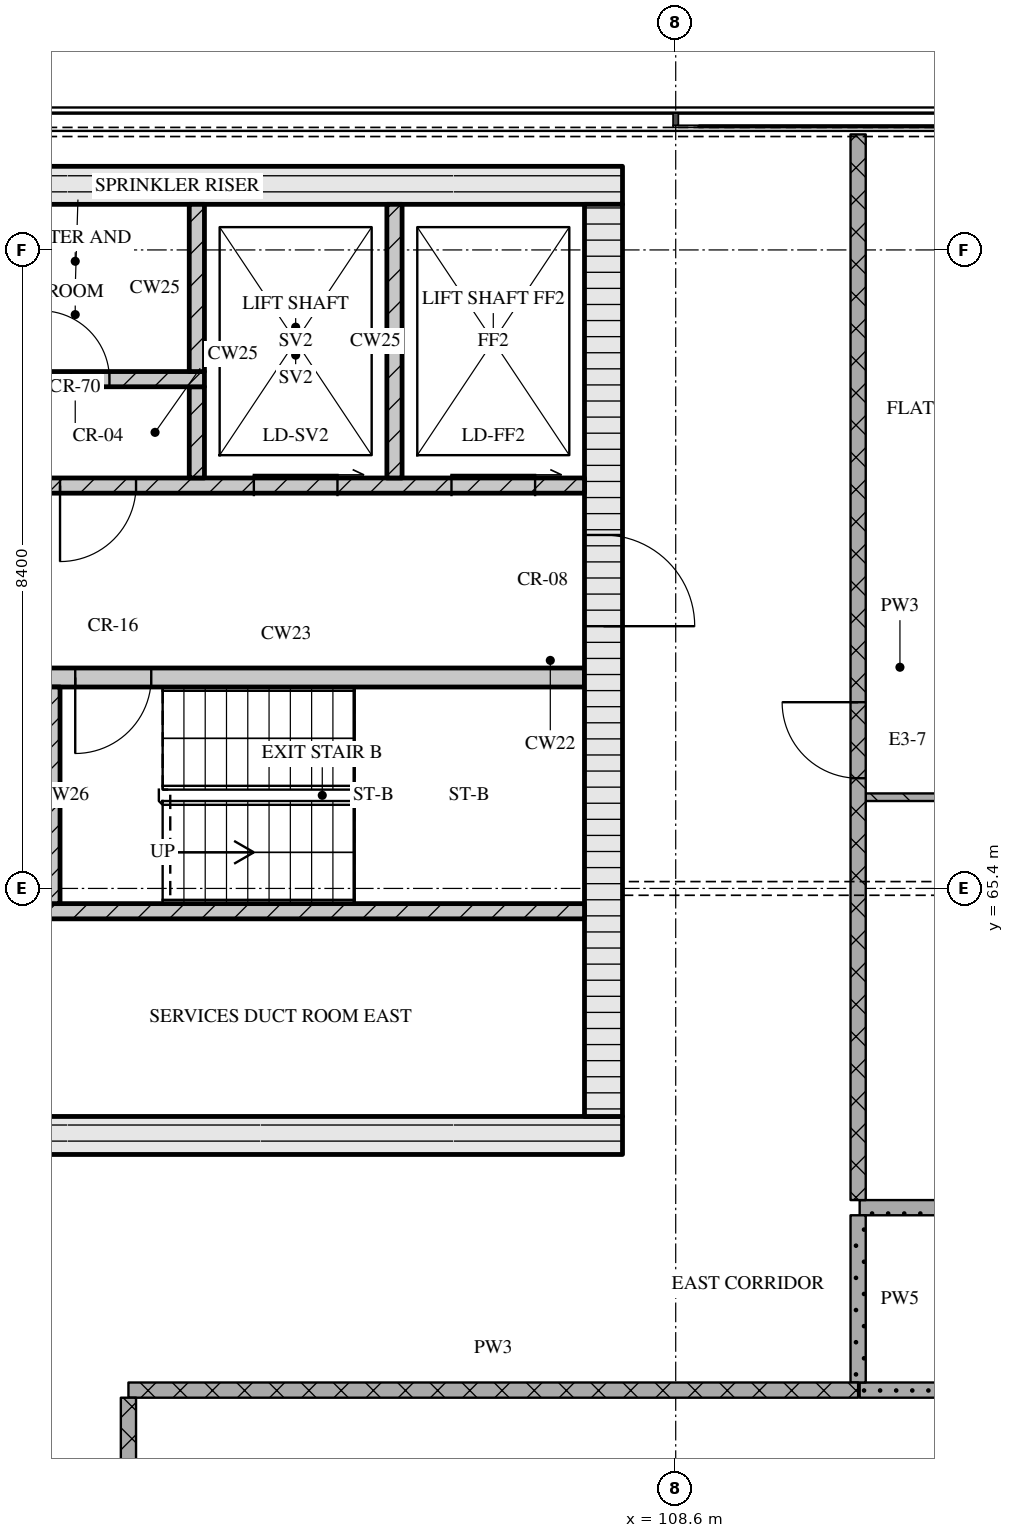
"""IFC4 building model, lengths in metres.
Left out: names, types, materials, properties, quantities, classifications, styles, units other than length and angle.
Written with IfcOpenShell. Run it as: python <this file> out.ifc"""

import sys

from ifc_helpers import new_model, si_unit, direction, frame, frame_2d, origin, place, context, subcontext, project, spatial, rectangle, extrude, element, fill, save


model = new_model("IFC4")
c1 = context("Model", 3, precision=1e-05, world=origin(), true_north=direction((0.0, 1.0)))
c2 = subcontext(c1, "Body", "Model", "MODEL_VIEW")
j1 = project(units=[si_unit("LENGTHUNIT", "METRE"), si_unit("PLANEANGLEUNIT", "RADIAN")], contexts=[c1])
p1 = place(None, origin())
s1 = spatial("IfcSite", under=j1, at=p1, CompositionType="ELEMENT")
p2 = place(p1, origin())
s2 = spatial("IfcBuilding", under=s1, at=p2, CompositionType="ELEMENT")
p3 = place(p2, frame((0.0, 0.0, 277.95)))
s3 = spatial("IfcBuildingStorey", under=s2, at=p3, CompositionType="ELEMENT", Elevation=277.95)
p4 = place(p3, frame((67.3, 62.15, 0.0), z_axis=(0.0, 0.0, 1.0), x_axis=(1.0, 0.0, 0.0)))
e1 = element("IfcWall", 1, at=p4, inside=s3, PredefinedType="SOLIDWALL", context=c2, shape_type="SweptSolid", body=[
    extrude(rectangle(XDim=40.6, YDim=0.5, at=frame_2d((20.3, 0.0))), origin(), (0.0, 0.0, 1.0), 3.32),
])
p5 = place(p4, frame((20.65, 0.0, 0.0)))
e2 = element("IfcOpeningElement", 2, at=p5, cuts=e1, PredefinedType="OPENING", context=c2, shape_type="SweptSolid", body=[
    extrude(rectangle(XDim=1.8, YDim=2.1, at=frame_2d((0.9, 1.05))), frame((0.0, 0.26, 0.0), z_axis=(0.0, -1.0, 0.0), x_axis=(1.0, 0.0, 0.0)), (0.0, 0.0, 1.0), 0.52),
])
p6 = place(p3, frame((67.3, 74.65, 0.0), z_axis=(0.0, 0.0, 1.0), x_axis=(1.0, 0.0, 0.0)))
e3 = element("IfcWall", 3, at=p6, inside=s3, PredefinedType="SOLIDWALL", context=c2, shape_type="SweptSolid", body=[
    extrude(rectangle(XDim=40.6, YDim=0.5, at=frame_2d((20.3, 0.0))), origin(), (0.0, 0.0, 1.0), 3.32),
])
p7 = place(p3, frame((107.65, 62.4, 0.0), z_axis=(0.0, 0.0, 1.0), x_axis=(0.0, 1.0, 0.0)))
e4 = element("IfcWall", 4, at=p7, inside=s3, PredefinedType="SOLIDWALL", context=c2, shape_type="SweptSolid", body=[
    extrude(rectangle(XDim=12.0, YDim=0.5, at=frame_2d((6.0, 0.0))), origin(), (0.0, 0.0, 1.0), 3.32),
])
p8 = place(p7, frame((6.45, 0.0, 0.0)))
e5 = element("IfcOpeningElement", 5, at=p8, cuts=e4, PredefinedType="OPENING", context=c2, shape_type="SweptSolid", body=[
    extrude(rectangle(XDim=1.2, YDim=2.1, at=frame_2d((0.6, 1.05))), frame((0.0, 0.26, 0.0), z_axis=(0.0, -1.0, 0.0), x_axis=(1.0, 0.0, 0.0)), (0.0, 0.0, 1.0), 0.52),
])
p9 = place(p3, frame((91.4, 65.1, 0.0), z_axis=(0.0, 0.0, 1.0), x_axis=(1.0, 0.0, 0.0)))
e6 = element("IfcWall", 6, at=p9, inside=s3, PredefinedType="SOLIDWALL", context=c2, shape_type="SweptSolid", body=[
    extrude(rectangle(XDim=16.0, YDim=0.2, at=frame_2d((8.0, 0.0))), origin(), (0.0, 0.0, 1.0), 3.32),
])
p10 = place(p9, frame((0.85, 0.0, 0.0)))
e7 = element("IfcOpeningElement", 7, at=p10, cuts=e6, PredefinedType="OPENING", context=c2, shape_type="SweptSolid", body=[
    extrude(rectangle(XDim=1.1, YDim=2.1, at=frame_2d((0.55, 1.05))), frame((0.0, 0.11, 0.0), z_axis=(0.0, -1.0, 0.0), x_axis=(1.0, 0.0, 0.0)), (0.0, 0.0, 1.0), 0.22),
])
p11 = place(p9, frame((3.35, 0.0, 0.0)))
e8 = element("IfcOpeningElement", 8, at=p11, cuts=e6, PredefinedType="OPENING", context=c2, shape_type="SweptSolid", body=[
    extrude(rectangle(XDim=1.1, YDim=2.1, at=frame_2d((0.55, 1.05))), frame((0.0, 0.11, 0.0), z_axis=(0.0, -1.0, 0.0), x_axis=(1.0, 0.0, 0.0)), (0.0, 0.0, 1.0), 0.22),
])
p12 = place(p9, frame((5.85, 0.0, 0.0)))
e9 = element("IfcOpeningElement", 9, at=p12, cuts=e6, PredefinedType="OPENING", context=c2, shape_type="SweptSolid", body=[
    extrude(rectangle(XDim=1.1, YDim=2.1, at=frame_2d((0.55, 1.05))), frame((0.0, 0.11, 0.0), z_axis=(0.0, -1.0, 0.0), x_axis=(1.0, 0.0, 0.0)), (0.0, 0.0, 1.0), 0.22),
])
p13 = place(p9, frame((7.83, 0.0, 0.0)))
e10 = element("IfcOpeningElement", 10, at=p13, cuts=e6, PredefinedType="OPENING", context=c2, shape_type="SweptSolid", body=[
    extrude(rectangle(XDim=0.9, YDim=2.1, at=frame_2d((0.45, 1.05))), frame((0.0, 0.11, 0.0), z_axis=(0.0, -1.0, 0.0), x_axis=(1.0, 0.0, 0.0)), (0.0, 0.0, 1.0), 0.22),
])
p14 = place(p3, frame((100.35, 65.2, 0.0), z_axis=(0.0, 0.0, 1.0), x_axis=(0.0, 1.0, 0.0)))
e11 = element("IfcWall", 11, at=p14, inside=s3, PredefinedType="SOLIDWALL", context=c2, shape_type="SweptSolid", body=[
    extrude(rectangle(XDim=2.85, YDim=0.3, at=frame_2d((1.425, 0.0))), origin(), (0.0, 0.0, 1.0), 3.32),
])
p15 = place(p3, frame((98.95, 68.175, 0.0), z_axis=(0.0, 0.0, 1.0), x_axis=(1.0, 0.0, 0.0)))
e12 = element("IfcWall", 12, at=p15, inside=s3, PredefinedType="SOLIDWALL", context=c2, shape_type="SweptSolid", body=[
    extrude(rectangle(XDim=8.45, YDim=0.25, at=frame_2d((4.225, 0.0))), origin(), (0.0, 0.0, 1.0), 3.32),
])
p16 = place(p15, frame((0.45, 0.0, 0.0)))
e13 = element("IfcOpeningElement", 13, at=p16, cuts=e12, PredefinedType="OPENING", context=c2, shape_type="SweptSolid", body=[
    extrude(rectangle(XDim=0.8, YDim=2.1, at=frame_2d((0.4, 1.05))), frame((0.0, 0.135, 0.0), z_axis=(0.0, -1.0, 0.0), x_axis=(1.0, 0.0, 0.0)), (0.0, 0.0, 1.0), 0.27),
])
p17 = place(p15, frame((1.75, 0.0, 0.0)))
e14 = element("IfcOpeningElement", 14, at=p17, cuts=e12, PredefinedType="OPENING", context=c2, shape_type="SweptSolid", body=[
    extrude(rectangle(XDim=1.0, YDim=2.1, at=frame_2d((0.5, 1.05))), frame((0.0, 0.135, 0.0), z_axis=(0.0, -1.0, 0.0), x_axis=(1.0, 0.0, 0.0)), (0.0, 0.0, 1.0), 0.27),
])
p18 = place(p3, frame((67.8, 70.7, 0.0), z_axis=(0.0, 0.0, 1.0), x_axis=(1.0, 0.0, 0.0)))
e15 = element("IfcWall", 15, at=p18, inside=s3, PredefinedType="SOLIDWALL", context=c2, shape_type="SweptSolid", body=[
    extrude(rectangle(XDim=39.6, YDim=0.2, at=frame_2d((19.8, 0.0))), origin(), (0.0, 0.0, 1.0), 3.32),
])
p19 = place(p18, frame((0.65, 0.0, 0.0)))
e16 = element("IfcOpeningElement", 16, at=p19, cuts=e15, PredefinedType="OPENING", context=c2, shape_type="SweptSolid", body=[
    extrude(rectangle(XDim=1.1, YDim=2.1, at=frame_2d((0.55, 1.05))), frame((0.0, 0.11, 0.0), z_axis=(0.0, -1.0, 0.0), x_axis=(1.0, 0.0, 0.0)), (0.0, 0.0, 1.0), 0.22),
])
p20 = place(p18, frame((3.25, 0.0, 0.0)))
e17 = element("IfcOpeningElement", 17, at=p20, cuts=e15, PredefinedType="OPENING", context=c2, shape_type="SweptSolid", body=[
    extrude(rectangle(XDim=1.1, YDim=2.1, at=frame_2d((0.55, 1.05))), frame((0.0, 0.11, 0.0), z_axis=(0.0, -1.0, 0.0), x_axis=(1.0, 0.0, 0.0)), (0.0, 0.0, 1.0), 0.22),
])
p21 = place(p18, frame((5.9, 0.0, 0.0)))
e18 = element("IfcOpeningElement", 18, at=p21, cuts=e15, PredefinedType="OPENING", context=c2, shape_type="SweptSolid", body=[
    extrude(rectangle(XDim=1.0, YDim=2.1, at=frame_2d((0.5, 1.05))), frame((0.0, 0.11, 0.0), z_axis=(0.0, -1.0, 0.0), x_axis=(1.0, 0.0, 0.0)), (0.0, 0.0, 1.0), 0.22),
])
p22 = place(p18, frame((21.7, 0.0, 0.0)))
e19 = element("IfcOpeningElement", 19, at=p22, cuts=e15, PredefinedType="OPENING", context=c2, shape_type="SweptSolid", body=[
    extrude(rectangle(XDim=1.0, YDim=2.1, at=frame_2d((0.5, 1.05))), frame((0.0, 0.11, 0.0), z_axis=(0.0, -1.0, 0.0), x_axis=(1.0, 0.0, 0.0)), (0.0, 0.0, 1.0), 0.22),
])
p23 = place(p18, frame((32.7, 0.0, 0.0)))
e20 = element("IfcOpeningElement", 20, at=p23, cuts=e15, PredefinedType="OPENING", context=c2, shape_type="SweptSolid", body=[
    extrude(rectangle(XDim=1.0, YDim=2.1, at=frame_2d((0.5, 1.05))), frame((0.0, 0.11, 0.0), z_axis=(0.0, -1.0, 0.0), x_axis=(1.0, 0.0, 0.0)), (0.0, 0.0, 1.0), 0.22),
])
p24 = place(p18, frame((35.25, 0.0, 0.0)))
e21 = element("IfcOpeningElement", 21, at=p24, cuts=e15, PredefinedType="OPENING", context=c2, shape_type="SweptSolid", body=[
    extrude(rectangle(XDim=1.1, YDim=2.1, at=frame_2d((0.55, 1.05))), frame((0.0, 0.11, 0.0), z_axis=(0.0, -1.0, 0.0), x_axis=(1.0, 0.0, 0.0)), (0.0, 0.0, 1.0), 0.22),
])
p25 = place(p18, frame((37.85, 0.0, 0.0)))
e22 = element("IfcOpeningElement", 22, at=p25, cuts=e15, PredefinedType="OPENING", context=c2, shape_type="SweptSolid", body=[
    extrude(rectangle(XDim=1.1, YDim=2.1, at=frame_2d((0.55, 1.05))), frame((0.0, 0.11, 0.0), z_axis=(0.0, -1.0, 0.0), x_axis=(1.0, 0.0, 0.0)), (0.0, 0.0, 1.0), 0.22),
])
p26 = place(p3, frame((102.3, 70.8, 0.0), z_axis=(0.0, 0.0, 1.0), x_axis=(0.0, 1.0, 0.0)))
e23 = element("IfcWall", 23, at=p26, inside=s3, PredefinedType="SOLIDWALL", context=c2, shape_type="SweptSolid", body=[
    extrude(rectangle(XDim=1.2, YDim=0.2, at=frame_2d((0.6, 0.0))), origin(), (0.0, 0.0, 1.0), 3.32),
])
p27 = place(p3, frame((104.9, 70.8, 0.0), z_axis=(0.0, 0.0, 1.0), x_axis=(0.0, 1.0, 0.0)))
e24 = element("IfcWall", 24, at=p27, inside=s3, PredefinedType="SOLIDWALL", context=c2, shape_type="SweptSolid", body=[
    extrude(rectangle(XDim=3.6, YDim=0.2, at=frame_2d((1.8, 0.0))), origin(), (0.0, 0.0, 1.0), 3.32),
])
p28 = place(p3, frame((95.08, 72.1, 0.0), z_axis=(0.0, 0.0, 1.0), x_axis=(1.0, 0.0, 0.0)))
e25 = element("IfcWall", 25, at=p28, inside=s3, PredefinedType="SOLIDWALL", context=c2, shape_type="SweptSolid", body=[
    extrude(rectangle(XDim=7.32, YDim=0.2, at=frame_2d((3.66, 0.0))), origin(), (0.0, 0.0, 1.0), 3.32),
])
p29 = place(p28, frame((0.52, 0.0, 0.0)))
e26 = element("IfcOpeningElement", 26, at=p29, cuts=e25, PredefinedType="OPENING", context=c2, shape_type="SweptSolid", body=[
    extrude(rectangle(XDim=0.9, YDim=2.1, at=frame_2d((0.45, 1.05))), frame((0.0, 0.11, 0.0), z_axis=(0.0, -1.0, 0.0), x_axis=(1.0, 0.0, 0.0)), (0.0, 0.0, 1.0), 0.22),
])
p30 = place(p28, frame((2.48, 0.0, 0.0)))
e27 = element("IfcOpeningElement", 27, at=p30, cuts=e25, PredefinedType="OPENING", context=c2, shape_type="SweptSolid", body=[
    extrude(rectangle(XDim=0.9, YDim=2.1, at=frame_2d((0.45, 1.05))), frame((0.0, 0.11, 0.0), z_axis=(0.0, -1.0, 0.0), x_axis=(1.0, 0.0, 0.0)), (0.0, 0.0, 1.0), 0.22),
])
p31 = place(p28, frame((5.17, 0.0, 0.0)))
e28 = element("IfcOpeningElement", 28, at=p31, cuts=e25, PredefinedType="OPENING", context=c2, shape_type="SweptSolid", body=[
    extrude(rectangle(XDim=0.9, YDim=2.1, at=frame_2d((0.45, 1.05))), frame((0.0, 0.11, 0.0), z_axis=(0.0, -1.0, 0.0), x_axis=(1.0, 0.0, 0.0)), (0.0, 0.0, 1.0), 0.22),
])
p32 = place(p3, frame((102.3, 72.2, 0.0), z_axis=(0.0, 0.0, 1.0), x_axis=(0.0, 1.0, 0.0)))
e29 = element("IfcWall", 29, at=p32, inside=s3, PredefinedType="SOLIDWALL", context=c2, shape_type="SweptSolid", body=[
    extrude(rectangle(XDim=2.2, YDim=0.2, at=frame_2d((1.1, 0.0))), origin(), (0.0, 0.0, 1.0), 3.32),
])
p33 = place(p3, frame((101.4, 58.8, 0.0), z_axis=(0.0, 0.0, 1.0), x_axis=(1.0, 0.0, 0.0)))
e30 = element("IfcWall", 30, at=p33, inside=s3, PredefinedType="PARTITIONING", context=c2, shape_type="SweptSolid", body=[
    extrude(rectangle(XDim=9.6, YDim=0.2, at=frame_2d((4.8, 0.0))), origin(), (0.0, 0.0, 1.0), 3.32),
])
p34 = place(p3, frame((111.02, 58.8, 0.0), z_axis=(0.0, 0.0, 1.0), x_axis=(1.0, 0.0, 0.0)))
e31 = element("IfcWall", 31, at=p34, inside=s3, PredefinedType="PARTITIONING", context=c2, shape_type="SweptSolid", body=[
    extrude(rectangle(XDim=7.48, YDim=0.2, at=frame_2d((3.74, 0.0))), origin(), (0.0, 0.0, 1.0), 3.32),
])
p35 = place(p3, frame((111.02, 61.2, 0.0), z_axis=(0.0, 0.0, 1.0), x_axis=(1.0, 0.0, 0.0)))
e32 = element("IfcWall", 32, at=p35, inside=s3, PredefinedType="PARTITIONING", context=c2, shape_type="SweptSolid", body=[
    extrude(rectangle(XDim=2.66, YDim=0.2, at=frame_2d((1.33, 0.0))), origin(), (0.0, 0.0, 1.0), 3.32),
])
p36 = place(p3, frame((111.1, 66.6, 0.0), z_axis=(0.0, 0.0, 1.0), x_axis=(1.0, 0.0, 0.0)))
e33 = element("IfcWall", 33, at=p36, inside=s3, PredefinedType="PARTITIONING", context=c2, shape_type="SweptSolid", body=[
    extrude(rectangle(XDim=2.6, YDim=0.1, at=frame_2d((1.3, 0.0))), origin(), (0.0, 0.0, 1.0), 3.32),
])
p37 = place(p3, frame((101.4, 58.7, 0.0), z_axis=(0.0, 0.0, 1.0), x_axis=(0.0, -1.0, 0.0)))
e34 = element("IfcWall", 34, at=p37, inside=s3, PredefinedType="PARTITIONING", context=c2, shape_type="SweptSolid", body=[
    extrude(rectangle(XDim=8.0, YDim=0.2, at=frame_2d((4.0, 0.0))), origin(), (0.0, 0.0, 1.0), 3.32),
])
p38 = place(p37, frame((2.85, 0.0, 0.0)))
e35 = element("IfcOpeningElement", 35, at=p38, cuts=e34, PredefinedType="OPENING", context=c2, shape_type="SweptSolid", body=[
    extrude(rectangle(XDim=1.0, YDim=2.1, at=frame_2d((0.5, 1.05))), frame((0.0, 0.11, 0.0), z_axis=(0.0, -1.0, 0.0), x_axis=(1.0, 0.0, 0.0)), (0.0, 0.0, 1.0), 0.22),
])
p39 = place(p3, frame((111.0, 75.32, 0.0), z_axis=(0.0, 0.0, 1.0), x_axis=(0.0, -1.0, 0.0)))
e36 = element("IfcWall", 36, at=p39, inside=s3, PredefinedType="PARTITIONING", context=c2, shape_type="SweptSolid", body=[
    extrude(rectangle(XDim=14.02, YDim=0.2, at=frame_2d((7.01, 0.0))), origin(), (0.0, 0.0, 1.0), 3.32),
])
p40 = place(p39, frame((7.47, 0.0, 0.0)))
e37 = element("IfcOpeningElement", 37, at=p40, cuts=e36, PredefinedType="OPENING", context=c2, shape_type="SweptSolid", body=[
    extrude(rectangle(XDim=1.0, YDim=2.1, at=frame_2d((0.5, 1.05))), frame((0.0, 0.11, 0.0), z_axis=(0.0, -1.0, 0.0), x_axis=(1.0, 0.0, 0.0)), (0.0, 0.0, 1.0), 0.22),
])
p41 = place(p3, frame((111.0, 61.1, 0.0), z_axis=(0.0, 0.0, 1.0), x_axis=(0.0, -1.0, 0.0)))
e38 = element("IfcWall", 38, at=p41, inside=s3, PredefinedType="PARTITIONING", context=c2, shape_type="SweptSolid", body=[
    extrude(rectangle(XDim=2.2, YDim=0.2, at=frame_2d((1.1, 0.0))), origin(), (0.0, 0.0, 1.0), 3.32),
])
p42 = place(p17, origin())
e39 = element("IfcDoor", 39, at=p42, inside=s3, OperationType="SINGLE_SWING_RIGHT", PredefinedType="DOOR", context=c2, shape_type="SweptSolid", body=[
    extrude(rectangle(XDim=1.0, YDim=2.1, at=frame_2d((0.5, 1.05))), frame((0.0, 0.025, 0.0), z_axis=(0.0, -1.0, 0.0), x_axis=(1.0, 0.0, 0.0)), (0.0, 0.0, 1.0), 0.05),
])
fill(e14, e39)
p43 = place(p8, origin())
e40 = element("IfcDoor", 40, at=p43, inside=s3, OperationType="SINGLE_SWING_RIGHT", PredefinedType="DOOR", context=c2, shape_type="SweptSolid", body=[
    extrude(rectangle(XDim=1.2, YDim=2.1, at=frame_2d((0.6, 1.05))), frame((0.0, 0.025, 0.0), z_axis=(0.0, -1.0, 0.0), x_axis=(1.0, 0.0, 0.0)), (0.0, 0.0, 1.0), 0.05),
])
fill(e5, e40)
p44 = place(p23, origin())
e41 = element("IfcDoor", 41, at=p44, inside=s3, OperationType="SINGLE_SWING_RIGHT", PredefinedType="DOOR", context=c2, shape_type="SweptSolid", body=[
    extrude(rectangle(XDim=1.0, YDim=2.1, at=frame_2d((0.5, 1.05))), frame((0.0, 0.025, 0.0), z_axis=(0.0, -1.0, 0.0), x_axis=(1.0, 0.0, 0.0)), (0.0, 0.0, 1.0), 0.05),
])
fill(e20, e41)
p45 = place(p24, origin())
e42 = element("IfcDoor", 42, at=p45, inside=s3, OperationType="SLIDING_TO_RIGHT", PredefinedType="DOOR", context=c2, shape_type="SweptSolid", body=[
    extrude(rectangle(XDim=1.1, YDim=2.1, at=frame_2d((0.55, 1.05))), frame((0.0, 0.025, 0.0), z_axis=(0.0, -1.0, 0.0), x_axis=(1.0, 0.0, 0.0)), (0.0, 0.0, 1.0), 0.05),
])
fill(e21, e42)
p46 = place(p25, origin())
e43 = element("IfcDoor", 43, at=p46, inside=s3, OperationType="SLIDING_TO_RIGHT", PredefinedType="DOOR", context=c2, shape_type="SweptSolid", body=[
    extrude(rectangle(XDim=1.1, YDim=2.1, at=frame_2d((0.55, 1.05))), frame((0.0, 0.025, 0.0), z_axis=(0.0, -1.0, 0.0), x_axis=(1.0, 0.0, 0.0)), (0.0, 0.0, 1.0), 0.05),
])
fill(e22, e43)
p47 = place(p31, origin())
e44 = element("IfcDoor", 44, at=p47, inside=s3, OperationType="SINGLE_SWING_LEFT", PredefinedType="DOOR", context=c2, shape_type="SweptSolid", body=[
    extrude(rectangle(XDim=0.9, YDim=2.1, at=frame_2d((0.45, 1.05))), frame((0.0, 0.025, 0.0), z_axis=(0.0, -1.0, 0.0), x_axis=(1.0, 0.0, 0.0)), (0.0, 0.0, 1.0), 0.05),
])
fill(e28, e44)
p48 = place(p40, origin())
e45 = element("IfcDoor", 45, at=p48, inside=s3, OperationType="SINGLE_SWING_RIGHT", PredefinedType="DOOR", context=c2, shape_type="SweptSolid", body=[
    extrude(rectangle(XDim=1.0, YDim=2.1, at=frame_2d((0.5, 1.05))), frame((0.0, 0.025, 0.0), z_axis=(0.0, -1.0, 0.0), x_axis=(1.0, 0.0, 0.0)), (0.0, 0.0, 1.0), 0.05),
])
fill(e37, e45)
save(model, sys.argv[1])
